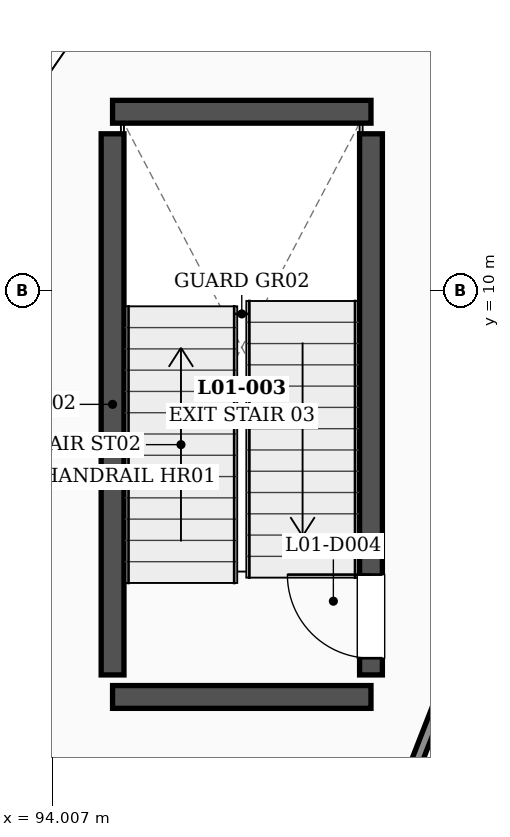
"""IFC4 building model, lengths in metres.
Left out: names, types, materials, properties, quantities, classifications, styles, units other than length and angle.
Written with IfcOpenShell. Run it as: python <this file> out.ifc"""

import sys

from ifc_helpers import new_model, si_unit, direction, frame, frame_2d, origin, place, context, subcontext, project, spatial, rectangle, extrude, element, fill, save


model = new_model("IFC4")
c1 = context("Model", 3, precision=1e-05, world=origin(), true_north=direction((0.0, 1.0)))
c2 = subcontext(c1, "Body", "Model", "MODEL_VIEW")
j1 = project(units=[si_unit("LENGTHUNIT", "METRE"), si_unit("PLANEANGLEUNIT", "RADIAN")], contexts=[c1])
p1 = place(None, origin())
s1 = spatial("IfcSite", under=j1, at=p1, CompositionType="ELEMENT")
p2 = place(p1, origin())
s2 = spatial("IfcBuilding", under=s1, at=p2, CompositionType="ELEMENT")
p3 = place(p2, frame((0.0, 0.0, 6.0)))
s3 = spatial("IfcBuildingStorey", under=s2, at=p3, CompositionType="ELEMENT", Elevation=6.0)
p4 = place(p3, frame((88.678, 4.697, 0.0), z_axis=(0.0, 0.0, 1.0), x_axis=(0.95182847269, -0.30663098111, 0.0)))
e1 = element("IfcWall", 1, at=p4, inside=s3, PredefinedType="SOLIDWALL", context=c2, shape_type="SweptSolid", body=[
    extrude(rectangle(XDim=9.785, YDim=0.32, at=frame_2d((4.893, 0.0))), origin(), (0.0, 0.0, 1.0), 3.61),
])
p5 = place(p4, frame((0.95, 0.0, 0.95)))
e2 = element("IfcOpeningElement", 2, at=p5, cuts=e1, PredefinedType="OPENING", context=c2, shape_type="SweptSolid", body=[
    extrude(rectangle(XDim=2.4, YDim=2.1, at=frame_2d((1.2, 1.05))), frame((0.0, 0.17, 0.0), z_axis=(0.0, -1.0, 0.0), x_axis=(1.0, 0.0, 0.0)), (0.0, 0.0, 1.0), 0.34),
])
p6 = place(p4, frame((6.435, 0.0, 0.95)))
e3 = element("IfcOpeningElement", 3, at=p6, cuts=e1, PredefinedType="OPENING", context=c2, shape_type="SweptSolid", body=[
    extrude(rectangle(XDim=2.4, YDim=2.1, at=frame_2d((1.2, 1.05))), frame((0.0, 0.17, 0.0), z_axis=(0.0, -1.0, 0.0), x_axis=(1.0, 0.0, 0.0)), (0.0, 0.0, 1.0), 0.34),
])
for number, where, z_axis, x_axis in (
    (4, (94.8, 4.65, 0.0), (0.0, 0.0, 1.0), (1.0, 0.0, 0.0)),
    (5, (94.8, 12.35, 0.0), (0.0, 0.0, 1.0), (1.0, 0.0, 0.0)),
):
    element("IfcWall", number, at=place(p3, frame(where, z_axis=z_axis, x_axis=x_axis)), inside=s3, PredefinedType="SHEAR", context=c2, shape_type="SweptSolid", body=[
        extrude(rectangle(XDim=3.4, YDim=0.3, at=frame_2d((1.7, 0.0))), origin(), (0.0, 0.0, 1.0), 4.8),
    ])
p7 = place(p3, frame((94.8, 4.94, 0.0), z_axis=(0.0, 0.0, 1.0), x_axis=(0.0, 1.0, 0.0)))
e6 = element("IfcWall", 6, at=p7, inside=s3, PredefinedType="SHEAR", context=c2, shape_type="SweptSolid", body=[
    extrude(rectangle(XDim=7.12, YDim=0.3, at=frame_2d((3.56, 0.0))), origin(), (0.0, 0.0, 1.0), 4.8),
])
p8 = place(p3, frame((98.2, 4.94, 0.0), z_axis=(0.0, 0.0, 1.0), x_axis=(0.0, 1.0, 0.0)))
e7 = element("IfcWall", 7, at=p8, inside=s3, PredefinedType="SHEAR", context=c2, shape_type="SweptSolid", body=[
    extrude(rectangle(XDim=7.12, YDim=0.3, at=frame_2d((3.56, 0.0))), origin(), (0.0, 0.0, 1.0), 4.8),
])
p9 = place(p8, frame((0.22, 0.0, 0.0)))
e8 = element("IfcOpeningElement", 8, at=p9, cuts=e7, PredefinedType="OPENING", context=c2, shape_type="SweptSolid", body=[
    extrude(rectangle(XDim=1.1, YDim=2.2, at=frame_2d((0.55, 1.1))), frame((0.0, 0.16, 0.0), z_axis=(0.0, -1.0, 0.0), x_axis=(1.0, 0.0, 0.0)), (0.0, 0.0, 1.0), 0.32),
])
p10 = place(p3, frame((99.166, 4.735, 0.0), z_axis=(0.0, 0.0, 1.0), x_axis=(-0.363270731714, -0.931683624134, 0.0)))
e9 = element("IfcWall", 9, at=p10, inside=s3, PredefinedType="PARTITIONING", context=c2, shape_type="SweptSolid", body=[
    extrude(rectangle(XDim=2.758, YDim=0.14, at=frame_2d((1.379, 0.0))), origin(), (0.0, 0.0, 1.0), 3.56),
])
p11 = place(p9, origin())
e10 = element("IfcDoor", 10, at=p11, inside=s3, OperationType="SINGLE_SWING_RIGHT", PredefinedType="DOOR", context=c2, shape_type="SweptSolid", body=[
    extrude(rectangle(XDim=1.1, YDim=2.2, at=frame_2d((0.55, 1.1))), frame((0.0, 0.025, 0.0), z_axis=(0.0, -1.0, 0.0), x_axis=(1.0, 0.0, 0.0)), (0.0, 0.0, 1.0), 0.05),
])
fill(e8, e10)
save(model, sys.argv[1])
